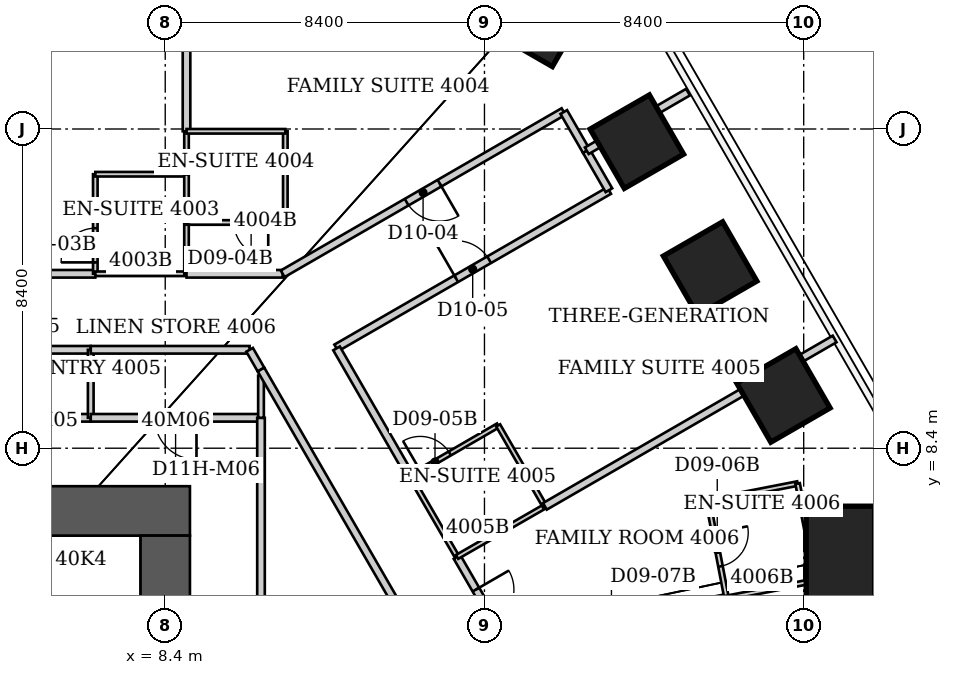
"""IFC4 building model, lengths in metres.
Left out: names, types, materials, properties, quantities, classifications, styles, units other than length and angle.
Written with IfcOpenShell. Run it as: python <this file> out.ifc"""

import sys

from ifc_helpers import new_model, si_unit, direction, frame, frame_2d, origin, origin_2d, place, context, subcontext, project, spatial, rectangle, extrude, element, fill, save


model = new_model("IFC4")
c1 = context("Model", 3, precision=1e-05, world=origin(), true_north=direction((0.0, 1.0)))
c2 = subcontext(c1, "Body", "Model", "MODEL_VIEW")
j1 = project(units=[si_unit("LENGTHUNIT", "METRE"), si_unit("PLANEANGLEUNIT", "RADIAN")], contexts=[c1])
p1 = place(None, origin())
s1 = spatial("IfcSite", under=j1, at=p1, CompositionType="ELEMENT")
p2 = place(p1, origin())
s2 = spatial("IfcBuilding", under=s1, at=p2, CompositionType="ELEMENT")
p3 = place(p2, frame((0.0, 0.0, 161.4)))
s3 = spatial("IfcBuildingStorey", under=s2, at=p3, CompositionType="ELEMENT", Elevation=161.4)
p4 = place(p3, frame((17.867, 19.898, 0.0), z_axis=(-0.041104111089, -0.045785234505, 0.998105287208), x_axis=(0.498342902409, 0.864887659108, 0.060197082496)))
e1 = element("IfcColumn", 1, at=p4, inside=s3, PredefinedType="COLUMN", context=c2, shape_type="SweptSolid", body=[
    extrude(rectangle(XDim=1.8, YDim=2.7, at=origin_2d()), origin(), (0.0, 0.0, 1.0), 3.807),
])
p5 = place(p3, frame((20.809, 16.467, 0.0), z_axis=(-0.046752521918, -0.037004396634, 0.998220855484), x_axis=(0.864714175605, 0.498788120692, 0.058989873412)))
e2 = element("IfcColumn", 2, at=p5, inside=s3, PredefinedType="COLUMN", context=c2, shape_type="SweptSolid", body=[
    extrude(rectangle(XDim=1.8, YDim=1.8, at=origin_2d()), origin(), (0.0, 0.0, 1.0), 3.807),
])
p6 = place(p3, frame((22.738, 13.128, 0.0), z_axis=(-0.051115371342, -0.029501970913, 0.998256907076), x_axis=(0.864585430267, 0.499007902036, 0.059018196136)))
e3 = element("IfcColumn", 3, at=p6, inside=s3, PredefinedType="COLUMN", context=c2, shape_type="SweptSolid", body=[
    extrude(rectangle(XDim=1.8, YDim=1.8, at=origin_2d()), origin(), (0.0, 0.0, 1.0), 3.807),
])
p7 = place(p3, frame((24.665, 9.788, 0.0), z_axis=(-0.055410421986, -0.021997424469, 0.99822131737), x_axis=(0.864198060677, 0.499682708675, 0.058982222519)))
e4 = element("IfcColumn", 4, at=p7, inside=s3, PredefinedType="COLUMN", context=c2, shape_type="SweptSolid", body=[
    extrude(rectangle(XDim=1.8, YDim=1.8, at=origin_2d()), origin(), (0.0, 0.0, 1.0), 3.807),
])
p8 = place(p3, frame((26.166, 5.524, 0.0), z_axis=(-0.06021332392, -0.012696739229, 0.998104778285), x_axis=(0.998185498237, -0.001024676941, 0.060205158806)))
e5 = element("IfcColumn", 5, at=p8, inside=s3, PredefinedType="COLUMN", context=c2, shape_type="SweptSolid", body=[
    extrude(rectangle(XDim=1.8, YDim=2.7, at=origin_2d()), origin(), (0.0, 0.0, 1.0), 3.807),
])
p9 = place(p3, frame((-9.05, 6.75, 0.0), z_axis=(0.0, 0.0, 1.0), x_axis=(1.0, 0.0, 0.0)))
e6 = element("IfcWall", 6, at=p9, inside=s3, PredefinedType="SHEAR", context=c2, shape_type="SweptSolid", body=[
    extrude(rectangle(XDim=18.1, YDim=1.3, at=frame_2d((9.05, 0.0))), origin(), (0.0, 0.0, 1.0), 3.8),
])
p10 = place(p3, frame((8.4, -9.2, 0.0), z_axis=(0.0, 0.0, 1.0), x_axis=(0.0, 1.0, 0.0)))
e7 = element("IfcWall", 7, at=p10, inside=s3, PredefinedType="SHEAR", context=c2, shape_type="SweptSolid", body=[
    extrude(rectangle(XDim=15.3, YDim=1.3, at=frame_2d((7.65, 0.0))), origin(), (0.0, 0.0, 1.0), 3.8),
])
p11 = place(p10, frame((10.7, 0.0, 0.0)))
e8 = element("IfcOpeningElement", 8, at=p11, cuts=e7, PredefinedType="OPENING", context=c2, shape_type="SweptSolid", body=[
    extrude(rectangle(XDim=1.2, YDim=2.2, at=frame_2d((0.6, 1.1))), frame((0.0, 0.65, 0.0), z_axis=(0.0, -1.0, 0.0), x_axis=(1.0, 0.0, 0.0)), (0.0, 0.0, 1.0), 1.3),
])
p12 = place(p3, frame((1.95, 10.99, 0.0), z_axis=(0.0, 0.0, 1.0), x_axis=(1.0, 0.0, 0.0)))
e9 = element("IfcWall", 9, at=p12, inside=s3, PredefinedType="PARTITIONING", context=c2, shape_type="SweptSolid", body=[
    extrude(rectangle(XDim=4.49, YDim=0.2, at=frame_2d((2.245, 0.0))), origin(), (0.0, 0.0, 1.0), 3.64),
])
p13 = place(p12, frame((1.695, 0.0, 0.0)))
e10 = element("IfcOpeningElement", 10, at=p13, cuts=e9, PredefinedType="OPENING", context=c2, shape_type="SweptSolid", body=[
    extrude(rectangle(XDim=1.1, YDim=2.2, at=frame_2d((0.55, 1.1))), frame((0.0, 0.1, 0.0), z_axis=(0.0, -1.0, 0.0), x_axis=(1.0, 0.0, 0.0)), (0.0, 0.0, 1.0), 0.2),
])
p14 = place(p3, frame((6.44, 9.2, 0.0), z_axis=(0.0, 0.0, 1.0), x_axis=(-1.0, 0.0, 0.0)))
e11 = element("IfcWall", 11, at=p14, inside=s3, PredefinedType="PARTITIONING", context=c2, shape_type="SweptSolid", body=[
    extrude(rectangle(XDim=4.49, YDim=0.2, at=frame_2d((2.245, 0.0))), origin(), (0.0, 0.0, 1.0), 3.64),
])
p15 = place(p3, frame((6.44, 10.99, 0.0), z_axis=(0.0, 0.0, 1.0), x_axis=(0.0, -1.0, 0.0)))
e12 = element("IfcWall", 12, at=p15, inside=s3, PredefinedType="PARTITIONING", context=c2, shape_type="SweptSolid", body=[
    extrude(rectangle(XDim=1.79, YDim=0.15, at=frame_2d((0.895, 0.0))), origin(), (0.0, 0.0, 1.0), 3.64),
])
p16 = place(p3, frame((6.44, 10.99, 0.0), z_axis=(0.0, 0.0, 1.0), x_axis=(1.0, 0.0, 0.0)))
e13 = element("IfcWall", 13, at=p16, inside=s3, PredefinedType="PARTITIONING", context=c2, shape_type="SweptSolid", body=[
    extrude(rectangle(XDim=4.18, YDim=0.2, at=frame_2d((2.09, 0.0))), origin(), (0.0, 0.0, 1.0), 3.64),
])
p17 = place(p3, frame((6.56, 12.99, 0.0), z_axis=(0.0, 0.0, 1.0), x_axis=(-1.0, 0.0, 0.0)))
e14 = element("IfcWall", 14, at=p17, inside=s3, PredefinedType="PARTITIONING", context=c2, shape_type="SweptSolid", body=[
    extrude(rectangle(XDim=3.295, YDim=0.2, at=frame_2d((1.647, 0.0))), origin(), (0.0, 0.0, 1.0), 3.64),
])
p18 = place(p3, frame((6.56, 15.61, 0.0), z_axis=(0.0, 0.0, 1.0), x_axis=(0.0, -1.0, 0.0)))
e15 = element("IfcWall", 15, at=p18, inside=s3, PredefinedType="PARTITIONING", context=c2, shape_type="SweptSolid", body=[
    extrude(rectangle(XDim=2.62, YDim=0.12, at=frame_2d((1.31, 0.0))), origin(), (0.0, 0.0, 1.0), 3.64),
])
p19 = place(p18, frame((1.42, 0.0, 0.0)))
e16 = element("IfcOpeningElement", 16, at=p19, cuts=e15, PredefinedType="OPENING", context=c2, shape_type="SweptSolid", body=[
    extrude(rectangle(XDim=0.9, YDim=2.03, at=frame_2d((0.45, 1.015))), frame((0.0, 0.06, 0.0), z_axis=(0.0, -1.0, 0.0), x_axis=(1.0, 0.0, 0.0)), (0.0, 0.0, 1.0), 0.12),
])
p20 = place(p3, frame((8.96, 12.99, 0.0), z_axis=(0.0, 0.0, 1.0), x_axis=(-1.0, 0.0, 0.0)))
e17 = element("IfcWall", 17, at=p20, inside=s3, PredefinedType="PARTITIONING", context=c2, shape_type="SweptSolid", body=[
    extrude(rectangle(XDim=2.4, YDim=0.12, at=frame_2d((1.2, 0.0))), origin(), (0.0, 0.0, 1.0), 3.64),
])
p21 = place(p3, frame((8.96, 14.34, 0.0), z_axis=(0.0, 0.0, 1.0), x_axis=(0.0, -1.0, 0.0)))
e18 = element("IfcWall", 18, at=p21, inside=s3, PredefinedType="PARTITIONING", context=c2, shape_type="SweptSolid", body=[
    extrude(rectangle(XDim=1.35, YDim=0.12, at=frame_2d((0.675, 0.0))), origin(), (0.0, 0.0, 1.0), 3.64),
])
p22 = place(p3, frame((8.96, 14.34, 0.0), z_axis=(0.0, 0.0, 1.0), x_axis=(1.0, 0.0, 0.0)))
e19 = element("IfcWall", 19, at=p22, inside=s3, PredefinedType="PARTITIONING", context=c2, shape_type="SweptSolid", body=[
    extrude(rectangle(XDim=2.6, YDim=0.12, at=frame_2d((1.3, 0.0))), origin(), (0.0, 0.0, 1.0), 3.64),
])
p23 = place(p22, frame((1.25, 0.0, 0.0)))
e20 = element("IfcOpeningElement", 20, at=p23, cuts=e19, PredefinedType="OPENING", context=c2, shape_type="SweptSolid", body=[
    extrude(rectangle(XDim=0.9, YDim=2.03, at=frame_2d((0.45, 1.015))), frame((0.0, 0.06, 0.0), z_axis=(0.0, -1.0, 0.0), x_axis=(1.0, 0.0, 0.0)), (0.0, 0.0, 1.0), 0.12),
])
p24 = place(p3, frame((8.96, 15.61, 0.0), z_axis=(0.0, 0.0, 1.0), x_axis=(-1.0, 0.0, 0.0)))
e21 = element("IfcWall", 21, at=p24, inside=s3, PredefinedType="PARTITIONING", context=c2, shape_type="SweptSolid", body=[
    extrude(rectangle(XDim=2.4, YDim=0.12, at=frame_2d((1.2, 0.0))), origin(), (0.0, 0.0, 1.0), 3.64),
])
p25 = place(p3, frame((8.96, 15.61, 0.0), z_axis=(0.0, 0.0, 1.0), x_axis=(0.0, -1.0, 0.0)))
e22 = element("IfcWall", 22, at=p25, inside=s3, PredefinedType="PARTITIONING", context=c2, shape_type="SweptSolid", body=[
    extrude(rectangle(XDim=1.27, YDim=0.12, at=frame_2d((0.635, 0.0))), origin(), (0.0, 0.0, 1.0), 3.64),
])
p26 = place(p3, frame((8.96, 16.74, 0.0), z_axis=(0.0, 0.0, 1.0), x_axis=(0.0, -1.0, 0.0)))
e23 = element("IfcWall", 23, at=p26, inside=s3, PredefinedType="PARTITIONING", context=c2, shape_type="SweptSolid", body=[
    extrude(rectangle(XDim=1.13, YDim=0.12, at=frame_2d((0.565, 0.0))), origin(), (0.0, 0.0, 1.0), 3.64),
])
p27 = place(p3, frame((8.96, 22.46, 0.0), z_axis=(0.0, 0.0, 1.0), x_axis=(0.0, -1.0, 0.0)))
e24 = element("IfcWall", 24, at=p27, inside=s3, PredefinedType="PARTITIONING", context=c2, shape_type="SweptSolid", body=[
    extrude(rectangle(XDim=5.72, YDim=0.2, at=frame_2d((2.86, 0.0))), origin(), (0.0, 0.0, 1.0), 3.64),
])
p28 = place(p3, frame((10.62, 10.99, 0.0), z_axis=(0.0, 0.0, 1.0), x_axis=(0.499464218792, -0.866334516308, 0.0)))
e25 = element("IfcWall", 25, at=p28, inside=s3, PredefinedType="PARTITIONING", context=c2, shape_type="SweptSolid", body=[
    extrude(rectangle(XDim=0.6, YDim=0.2, at=frame_2d((0.3, 0.0))), origin(), (0.0, 0.0, 1.0), 3.64),
])
p29 = place(p3, frame((10.905, 9.2, 0.0), z_axis=(0.0, 0.0, 1.0), x_axis=(-1.0, 0.0, 0.0)))
e26 = element("IfcWall", 26, at=p29, inside=s3, PredefinedType="PARTITIONING", context=c2, shape_type="SweptSolid", body=[
    extrude(rectangle(XDim=4.465, YDim=0.2, at=frame_2d((2.232, 0.0))), origin(), (0.0, 0.0, 1.0), 3.64),
])
p30 = place(p29, frame((1.683, 0.0, 0.0)))
e27 = element("IfcOpeningElement", 27, at=p30, cuts=e26, PredefinedType="OPENING", context=c2, shape_type="SweptSolid", body=[
    extrude(rectangle(XDim=1.1, YDim=2.2, at=frame_2d((0.55, 1.1))), frame((0.0, 0.1, 0.0), z_axis=(0.0, -1.0, 0.0), x_axis=(1.0, 0.0, 0.0)), (0.0, 0.0, 1.0), 0.2),
])
p31 = place(p3, frame((10.92, -5.07, 0.0), z_axis=(0.0, 0.0, 1.0), x_axis=(0.0, 1.0, 0.0)))
e28 = element("IfcWall", 28, at=p31, inside=s3, PredefinedType="PARTITIONING", context=c2, shape_type="SweptSolid", body=[
    extrude(rectangle(XDim=14.27, YDim=0.2, at=frame_2d((7.135, 0.0))), origin(), (0.0, 0.0, 1.0), 3.64),
])
p32 = place(p31, frame((6.585, 0.0, 0.0)))
e29 = element("IfcOpeningElement", 29, at=p32, cuts=e28, PredefinedType="OPENING", context=c2, shape_type="SweptSolid", body=[
    extrude(rectangle(XDim=1.1, YDim=2.2, at=frame_2d((0.55, 1.1))), frame((0.0, 0.1, 0.0), z_axis=(0.0, -1.0, 0.0), x_axis=(1.0, 0.0, 0.0)), (0.0, 0.0, 1.0), 0.2),
])
p33 = place(p3, frame((10.92, 10.31, 0.0), z_axis=(0.0, 0.0, 1.0), x_axis=(0.0, -1.0, 0.0)))
e30 = element("IfcWall", 30, at=p33, inside=s3, PredefinedType="PARTITIONING", context=c2, shape_type="SweptSolid", body=[
    extrude(rectangle(XDim=1.11, YDim=0.15, at=frame_2d((0.555, 0.0))), origin(), (0.0, 0.0, 1.0), 3.64),
])
p34 = place(p3, frame((10.92, 10.47, 0.0), z_axis=(0.0, 0.0, 1.0), x_axis=(0.500331533983, -0.865833907919, 0.0)))
e31 = element("IfcWall", 31, at=p34, inside=s3, PredefinedType="PARTITIONING", context=c2, shape_type="SweptSolid", body=[
    extrude(rectangle(XDim=8.974, YDim=0.2, at=frame_2d((4.487, 0.0))), origin(), (0.0, 0.0, 1.0), 3.64),
])
p35 = place(p3, frame((11.49, 12.99, 0.0), z_axis=(0.0, 0.0, 1.0), x_axis=(-1.0, 0.0, 0.0)))
e32 = element("IfcWall", 32, at=p35, inside=s3, PredefinedType="PARTITIONING", context=c2, shape_type="SweptSolid", body=[
    extrude(rectangle(XDim=2.53, YDim=0.2, at=frame_2d((1.265, 0.0))), origin(), (0.0, 0.0, 1.0), 3.64),
])
p36 = place(p3, frame((11.56, 14.34, 0.0), z_axis=(0.0, 0.0, 1.0), x_axis=(0.0, 1.0, 0.0)))
e33 = element("IfcWall", 33, at=p36, inside=s3, PredefinedType="PARTITIONING", context=c2, shape_type="SweptSolid", body=[
    extrude(rectangle(XDim=2.4, YDim=0.12, at=frame_2d((1.2, 0.0))), origin(), (0.0, 0.0, 1.0), 3.64),
])
p37 = place(p3, frame((11.56, 16.74, 0.0), z_axis=(0.0, 0.0, 1.0), x_axis=(-1.0, 0.0, 0.0)))
e34 = element("IfcWall", 34, at=p37, inside=s3, PredefinedType="PARTITIONING", context=c2, shape_type="SweptSolid", body=[
    extrude(rectangle(XDim=2.6, YDim=0.12, at=frame_2d((1.3, 0.0))), origin(), (0.0, 0.0, 1.0), 3.64),
])
p38 = place(p3, frame((12.9, 11.04, 0.0), z_axis=(0.0, 0.0, 1.0), x_axis=(0.86631698263, 0.499494630209, 0.0)))
e35 = element("IfcWall", 35, at=p38, inside=s3, PredefinedType="PARTITIONING", context=c2, shape_type="SweptSolid", body=[
    extrude(rectangle(XDim=8.288, YDim=0.2, at=frame_2d((4.144, 0.0))), origin(), (0.0, 0.0, 1.0), 3.64),
])
p39 = place(p38, frame((3.644, 0.0, 0.0)))
e36 = element("IfcOpeningElement", 36, at=p39, cuts=e35, PredefinedType="OPENING", context=c2, shape_type="SweptSolid", body=[
    extrude(rectangle(XDim=1.0, YDim=2.13, at=frame_2d((0.5, 1.065))), frame((0.0, 0.1, 0.0), z_axis=(0.0, -1.0, 0.0), x_axis=(1.0, 0.0, 0.0)), (0.0, 0.0, 1.0), 0.2),
])
p40 = place(p3, frame((12.907, 11.027, 0.0), z_axis=(0.0, 0.0, 1.0), x_axis=(0.499726078095, -0.86618349492, 0.0)))
e37 = element("IfcWall", 37, at=p40, inside=s3, PredefinedType="PARTITIONING", context=c2, shape_type="SweptSolid", body=[
    extrude(rectangle(XDim=3.887, YDim=0.2, at=frame_2d((1.944, 0.0))), origin(), (0.0, 0.0, 1.0), 3.64),
])
p41 = place(p3, frame((14.85, 7.66, 0.0), z_axis=(0.0, 0.0, 1.0), x_axis=(0.501856726365, -0.86495076519, 0.0)))
e38 = element("IfcWall", 38, at=p41, inside=s3, PredefinedType="PARTITIONING", context=c2, shape_type="SweptSolid", body=[
    extrude(rectangle(XDim=2.451, YDim=0.12, at=frame_2d((1.226, 0.0))), origin(), (0.0, 0.0, 1.0), 3.64),
])
p42 = place(p3, frame((16.078, 5.539, 0.0), z_axis=(0.0, 0.0, 1.0), x_axis=(0.500694494545, -0.865624065708, 0.0)))
e39 = element("IfcWall", 39, at=p42, inside=s3, PredefinedType="PARTITIONING", context=c2, shape_type="SweptSolid", body=[
    extrude(rectangle(XDim=2.985, YDim=0.2, at=frame_2d((1.493, 0.0))), origin(), (0.0, 0.0, 1.0), 3.64),
])
p43 = place(p42, frame((0.993, 0.0, 0.0)))
e40 = element("IfcOpeningElement", 40, at=p43, cuts=e39, PredefinedType="OPENING", context=c2, shape_type="SweptSolid", body=[
    extrude(rectangle(XDim=1.0, YDim=2.13, at=frame_2d((0.5, 1.065))), frame((0.0, 0.1, 0.0), z_axis=(0.0, -1.0, 0.0), x_axis=(1.0, 0.0, 0.0)), (0.0, 0.0, 1.0), 0.2),
])
p44 = place(p3, frame((16.08, 5.54, 0.0), z_axis=(0.0, 0.0, 1.0), x_axis=(0.86663205897, 0.498947767172, 0.0)))
e41 = element("IfcWall", 41, at=p44, inside=s3, PredefinedType="PARTITIONING", context=c2, shape_type="SweptSolid", body=[
    extrude(rectangle(XDim=2.665, YDim=0.12, at=frame_2d((1.333, 0.0))), origin(), (0.0, 0.0, 1.0), 3.64),
])
p45 = place(p3, frame((17.16, 9.0, 0.0), z_axis=(0.0, 0.0, 1.0), x_axis=(-0.864966903181, -0.501828911485, 0.0)))
e42 = element("IfcWall", 42, at=p45, inside=s3, PredefinedType="PARTITIONING", context=c2, shape_type="SweptSolid", body=[
    extrude(rectangle(XDim=2.67, YDim=0.12, at=frame_2d((1.335, 0.0))), origin(), (0.0, 0.0, 1.0), 3.64),
])
p46 = place(p45, frame((1.47, 0.0, 0.0)))
e43 = element("IfcOpeningElement", 43, at=p46, cuts=e42, PredefinedType="OPENING", context=c2, shape_type="SweptSolid", body=[
    extrude(rectangle(XDim=0.9, YDim=2.03, at=frame_2d((0.45, 1.015))), frame((0.0, 0.06, 0.0), z_axis=(0.0, -1.0, 0.0), x_axis=(1.0, 0.0, 0.0)), (0.0, 0.0, 1.0), 0.12),
])
p47 = place(p3, frame((18.39, 6.87, 0.0), z_axis=(0.0, 0.0, 1.0), x_axis=(-0.500089055364, 0.86597398154, 0.0)))
e44 = element("IfcWall", 44, at=p47, inside=s3, PredefinedType="PARTITIONING", context=c2, shape_type="SweptSolid", body=[
    extrude(rectangle(XDim=2.459, YDim=0.12, at=frame_2d((1.23, 0.0))), origin(), (0.0, 0.0, 1.0), 3.64),
])
p48 = place(p3, frame((18.39, 6.87, 0.0), z_axis=(0.0, 0.0, 1.0), x_axis=(0.865875215531, 0.500260043506, 0.0)))
e45 = element("IfcWall", 45, at=p48, inside=s3, PredefinedType="PARTITIONING", context=c2, shape_type="SweptSolid", body=[
    extrude(rectangle(XDim=8.805, YDim=0.2, at=frame_2d((4.402, 0.0))), origin(), (0.0, 0.0, 1.0), 3.64),
])
p49 = place(p3, frame((18.88, 17.26, 0.0), z_axis=(0.0, 0.0, 1.0), x_axis=(-0.865849652946, -0.500304285904, 0.0)))
e46 = element("IfcWall", 46, at=p49, inside=s3, PredefinedType="PARTITIONING", context=c2, shape_type="SweptSolid", body=[
    extrude(rectangle(XDim=8.535, YDim=0.2, at=frame_2d((4.268, 0.0))), origin(), (0.0, 0.0, 1.0), 3.64),
])
p50 = place(p49, frame((3.768, 0.0, 0.0)))
e47 = element("IfcOpeningElement", 47, at=p50, cuts=e46, PredefinedType="OPENING", context=c2, shape_type="SweptSolid", body=[
    extrude(rectangle(XDim=1.0, YDim=2.13, at=frame_2d((0.5, 1.065))), frame((0.0, 0.1, 0.0), z_axis=(0.0, -1.0, 0.0), x_axis=(1.0, 0.0, 0.0)), (0.0, 0.0, 1.0), 0.2),
])
p51 = place(p3, frame((18.887, 17.247, 0.0), z_axis=(0.0, 0.0, 1.0), x_axis=(0.499704629046, -0.866195869137, 0.0)))
e48 = element("IfcWall", 48, at=p51, inside=s3, PredefinedType="PARTITIONING", context=c2, shape_type="SweptSolid", body=[
    extrude(rectangle(XDim=1.186, YDim=0.2, at=frame_2d((0.593, 0.0))), origin(), (0.0, 0.0, 1.0), 3.64),
])
p52 = place(p3, frame((19.48, 16.22, 0.0), z_axis=(0.0, 0.0, 1.0), x_axis=(0.499734288277, -0.866178758179, 0.0)))
e49 = element("IfcWall", 49, at=p52, inside=s3, PredefinedType="PARTITIONING", context=c2, shape_type="SweptSolid", body=[
    extrude(rectangle(XDim=1.191, YDim=0.2, at=frame_2d((0.595, 0.0))), origin(), (0.0, 0.0, 1.0), 3.64),
])
p53 = place(p3, frame((20.0, 3.85, 0.0), z_axis=(0.0, 0.0, 1.0), x_axis=(0.981991339242, 0.188925936955, 0.0)))
e50 = element("IfcWall", 50, at=p53, inside=s3, PredefinedType="PARTITIONING", context=c2, shape_type="SweptSolid", body=[
    extrude(rectangle(XDim=3.228, YDim=0.2, at=frame_2d((1.614, 0.0))), origin(), (0.0, 0.0, 1.0), 3.64),
])
p54 = place(p3, frame((22.156, 17.77, 0.0), z_axis=(0.0, 0.0, 1.0), x_axis=(-0.865382833183, -0.501111317006, 0.0)))
e51 = element("IfcWall", 51, at=p54, inside=s3, PredefinedType="PARTITIONING", context=c2, shape_type="SweptSolid", body=[
    extrude(rectangle(XDim=3.078, YDim=0.2, at=frame_2d((1.539, 0.0))), origin(), (0.0, 0.0, 1.0), 3.64),
])
p55 = place(p3, frame((22.68, 7.01, 0.0), z_axis=(0.0, 0.0, 1.0), x_axis=(0.188697442844, -0.982035271802, 0.0)))
e52 = element("IfcWall", 52, at=p55, inside=s3, PredefinedType="PARTITIONING", context=c2, shape_type="SweptSolid", body=[
    extrude(rectangle(XDim=2.597, YDim=0.12, at=frame_2d((1.298, 0.0))), origin(), (0.0, 0.0, 1.0), 3.64),
])
p56 = place(p55, frame((0.85, 0.0, 0.0)))
e53 = element("IfcOpeningElement", 53, at=p56, cuts=e52, PredefinedType="OPENING", context=c2, shape_type="SweptSolid", body=[
    extrude(rectangle(XDim=0.9, YDim=2.03, at=frame_2d((0.45, 1.015))), frame((0.0, 0.06, 0.0), z_axis=(0.0, -1.0, 0.0), x_axis=(1.0, 0.0, 0.0)), (0.0, 0.0, 1.0), 0.12),
])
for number, where, z_axis, x_axis in (
    (54, (23.17, 4.46, 0.0), (0.0, 0.0, 1.0), (0.982, 0.191, 0.0)),
    (55, (25.04, 7.47, 0.0), (0.0, 0.0, 1.0), (-0.982, -0.191, 0.0)),
):
    element("IfcWall", number, at=place(p3, frame(where, z_axis=z_axis, x_axis=x_axis)), inside=s3, PredefinedType="PARTITIONING", context=c2, shape_type="SweptSolid", body=[
        extrude(rectangle(XDim=2.405, YDim=0.12, at=frame_2d((1.202, 0.0))), origin(), (0.0, 0.0, 1.0), 3.64),
    ])
p57 = place(p3, frame((25.53, 4.92, 0.0), z_axis=(0.0, 0.0, 1.0), x_axis=(-0.188697442844, 0.982035271802, 0.0)))
e56 = element("IfcWall", 56, at=p57, inside=s3, PredefinedType="PARTITIONING", context=c2, shape_type="SweptSolid", body=[
    extrude(rectangle(XDim=2.597, YDim=0.12, at=frame_2d((1.298, 0.0))), origin(), (0.0, 0.0, 1.0), 1.84),
])
p58 = place(p3, frame((28.74, 5.534, 0.0), z_axis=(0.0, 0.0, 1.0), x_axis=(-0.98161461266, -0.190873655101, 0.0)))
e57 = element("IfcWall", 57, at=p58, inside=s3, PredefinedType="PARTITIONING", context=c2, shape_type="SweptSolid", body=[
    extrude(rectangle(XDim=3.271, YDim=0.2, at=frame_2d((1.635, 0.0))), origin(), (0.0, 0.0, 1.0), 3.64),
])
p59 = place(p19, origin())
e58 = element("IfcDoor", 58, at=p59, inside=s3, OperationType="SINGLE_SWING_RIGHT", PredefinedType="DOOR", context=c2, shape_type="SweptSolid", body=[
    extrude(rectangle(XDim=0.9, YDim=2.03, at=frame_2d((0.45, 1.015))), frame((0.0, 0.025, 0.0), z_axis=(0.0, -1.0, 0.0), x_axis=(1.0, 0.0, 0.0)), (0.0, 0.0, 1.0), 0.05),
])
fill(e16, e58)
p60 = place(p50, origin())
e59 = element("IfcDoor", 59, at=p60, inside=s3, OperationType="SINGLE_SWING_LEFT", PredefinedType="DOOR", context=c2, shape_type="SweptSolid", body=[
    extrude(rectangle(XDim=1.0, YDim=2.13, at=frame_2d((0.5, 1.065))), frame((0.0, 0.025, 0.0), z_axis=(0.0, -1.0, 0.0), x_axis=(1.0, 0.0, 0.0)), (0.0, 0.0, 1.0), 0.05),
])
fill(e47, e59)
p61 = place(p23, origin())
e60 = element("IfcDoor", 60, at=p61, inside=s3, OperationType="SINGLE_SWING_RIGHT", PredefinedType="DOOR", context=c2, shape_type="SweptSolid", body=[
    extrude(rectangle(XDim=0.9, YDim=2.03, at=frame_2d((0.45, 1.015))), frame((0.0, 0.025, 0.0), z_axis=(0.0, -1.0, 0.0), x_axis=(1.0, 0.0, 0.0)), (0.0, 0.0, 1.0), 0.05),
])
fill(e20, e60)
p62 = place(p39, origin())
e61 = element("IfcDoor", 61, at=p62, inside=s3, OperationType="SINGLE_SWING_LEFT", PredefinedType="DOOR", context=c2, shape_type="SweptSolid", body=[
    extrude(rectangle(XDim=1.0, YDim=2.13, at=frame_2d((0.5, 1.065))), frame((0.0, 0.025, 0.0), z_axis=(0.0, -1.0, 0.0), x_axis=(1.0, 0.0, 0.0)), (0.0, 0.0, 1.0), 0.05),
])
fill(e36, e61)
p63 = place(p46, origin())
e62 = element("IfcDoor", 62, at=p63, inside=s3, OperationType="SINGLE_SWING_RIGHT", PredefinedType="DOOR", context=c2, shape_type="SweptSolid", body=[
    extrude(rectangle(XDim=0.9, YDim=2.03, at=frame_2d((0.45, 1.015))), frame((0.0, 0.025, 0.0), z_axis=(0.0, -1.0, 0.0), x_axis=(1.0, 0.0, 0.0)), (0.0, 0.0, 1.0), 0.05),
])
fill(e43, e62)
p64 = place(p43, origin())
e63 = element("IfcDoor", 63, at=p64, inside=s3, OperationType="SINGLE_SWING_LEFT", PredefinedType="DOOR", context=c2, shape_type="SweptSolid", body=[
    extrude(rectangle(XDim=1.0, YDim=2.13, at=frame_2d((0.5, 1.065))), frame((0.0, 0.025, 0.0), z_axis=(0.0, -1.0, 0.0), x_axis=(1.0, 0.0, 0.0)), (0.0, 0.0, 1.0), 0.05),
])
fill(e40, e63)
p65 = place(p56, origin())
e64 = element("IfcDoor", 64, at=p65, inside=s3, OperationType="SINGLE_SWING_LEFT", PredefinedType="DOOR", context=c2, shape_type="SweptSolid", body=[
    extrude(rectangle(XDim=0.9, YDim=2.03, at=frame_2d((0.45, 1.015))), frame((0.0, 0.025, 0.0), z_axis=(0.0, -1.0, 0.0), x_axis=(1.0, 0.0, 0.0)), (0.0, 0.0, 1.0), 0.05),
])
fill(e53, e64)
p66 = place(p30, origin())
e65 = element("IfcDoor", 65, at=p66, inside=s3, OperationType="SINGLE_SWING_LEFT", PredefinedType="DOOR", context=c2, shape_type="SweptSolid", body=[
    extrude(rectangle(XDim=1.1, YDim=2.2, at=frame_2d((0.55, 1.1))), frame((0.0, 0.025, 0.0), z_axis=(0.0, -1.0, 0.0), x_axis=(1.0, 0.0, 0.0)), (0.0, 0.0, 1.0), 0.05),
])
fill(e27, e65)
save(model, sys.argv[1])
